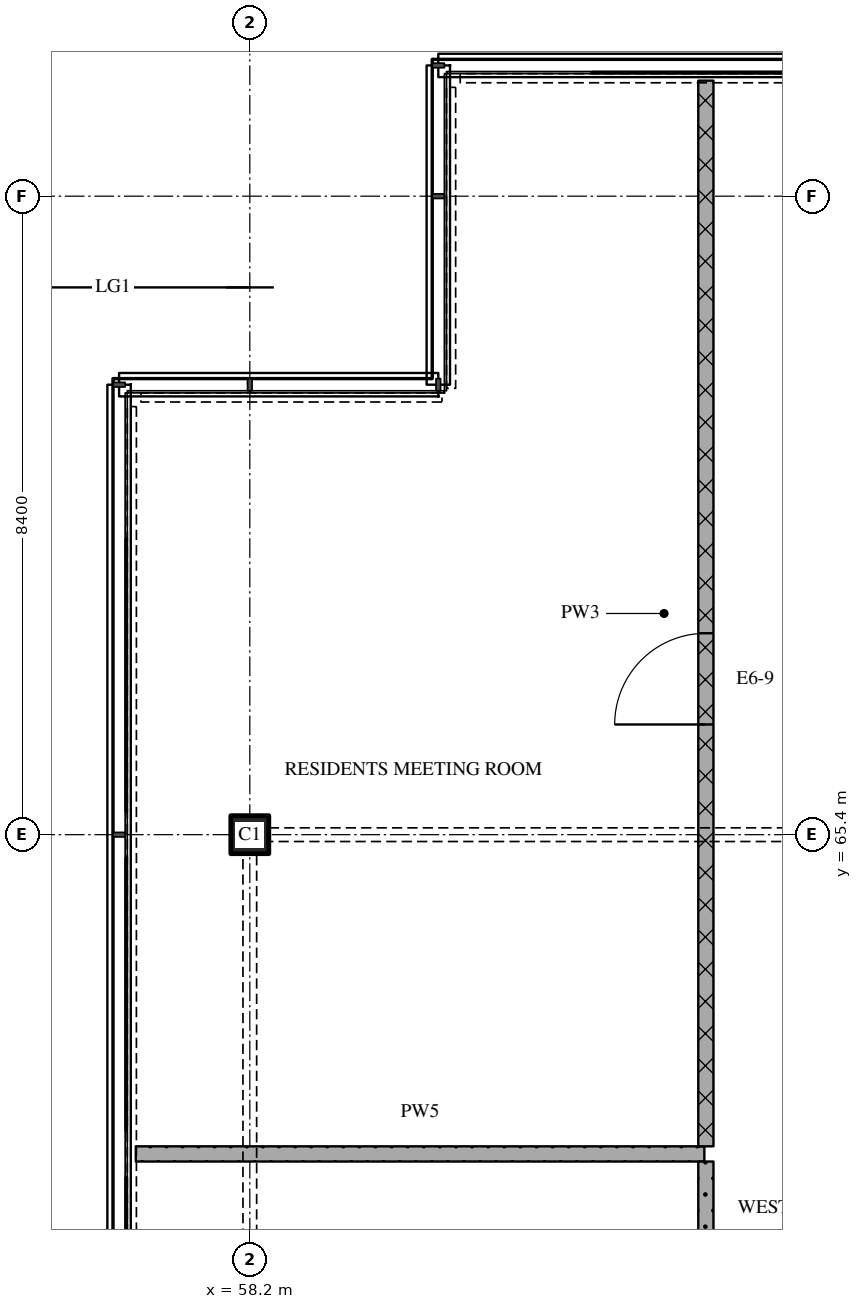
"""IFC4 building model, lengths in metres.
Left out: names, types, materials, properties, quantities, classifications, styles, units other than length and angle.
Written with IfcOpenShell. Run it as: python <this file> out.ifc"""

import sys

from ifc_helpers import new_model, si_unit, direction, frame, frame_2d, origin, origin_2d, place, context, subcontext, project, spatial, rectangle, extrude, element, fill, save


model = new_model("IFC4")
c1 = context("Model", 3, precision=1e-05, world=origin(), true_north=direction((0.0, 1.0)))
c2 = subcontext(c1, "Body", "Model", "MODEL_VIEW")
j1 = project(units=[si_unit("LENGTHUNIT", "METRE"), si_unit("PLANEANGLEUNIT", "RADIAN")], contexts=[c1])
p1 = place(None, origin())
s1 = spatial("IfcSite", under=j1, at=p1, CompositionType="ELEMENT")
p2 = place(p1, origin())
s2 = spatial("IfcBuilding", under=s1, at=p2, CompositionType="ELEMENT")
p3 = place(p2, frame((0.0, 0.0, 303.15)))
s3 = spatial("IfcBuildingStorey", under=s2, at=p3, CompositionType="ELEMENT", Elevation=303.15)
p4 = place(p3, frame((58.2, 65.4, 0.0), z_axis=(0.0, 0.0, 1.0), x_axis=(1.0, 0.0, 0.0)))
e1 = element("IfcColumn", 1, at=p4, inside=s3, PredefinedType="COLUMN", context=c2, shape_type="SweptSolid", body=[
    extrude(rectangle(XDim=0.5, YDim=0.5, at=origin_2d()), origin(), (0.0, 0.0, 1.0), 3.6),
])
p5 = place(p3, frame((56.7, 61.2, 0.0), z_axis=(0.0, 0.0, 1.0), x_axis=(1.0, 0.0, 0.0)))
e2 = element("IfcWall", 2, at=p5, inside=s3, PredefinedType="PARTITIONING", context=c2, shape_type="SweptSolid", body=[
    extrude(rectangle(XDim=7.48, YDim=0.2, at=frame_2d((3.74, 0.0))), origin(), (0.0, 0.0, 1.0), 3.32),
])
p6 = place(p3, frame((64.2, 61.3, 0.0), z_axis=(0.0, 0.0, 1.0), x_axis=(0.0, 1.0, 0.0)))
e3 = element("IfcWall", 3, at=p6, inside=s3, PredefinedType="PARTITIONING", context=c2, shape_type="SweptSolid", body=[
    extrude(rectangle(XDim=14.02, YDim=0.2, at=frame_2d((7.01, 0.0))), origin(), (0.0, 0.0, 1.0), 3.32),
])
p7 = place(p6, frame((5.55, 0.0, 0.0)))
e4 = element("IfcOpeningElement", 4, at=p7, cuts=e3, PredefinedType="OPENING", context=c2, shape_type="SweptSolid", body=[
    extrude(rectangle(XDim=1.2, YDim=2.1, at=frame_2d((0.6, 1.05))), frame((0.0, 0.11, 0.0), z_axis=(0.0, -1.0, 0.0), x_axis=(1.0, 0.0, 0.0)), (0.0, 0.0, 1.0), 0.22),
])
p8 = place(p3, frame((64.2, 61.1, 0.0), z_axis=(0.0, 0.0, 1.0), x_axis=(0.0, -1.0, 0.0)))
e5 = element("IfcWall", 5, at=p8, inside=s3, PredefinedType="PARTITIONING", context=c2, shape_type="SweptSolid", body=[
    extrude(rectangle(XDim=2.2, YDim=0.2, at=frame_2d((1.1, 0.0))), origin(), (0.0, 0.0, 1.0), 3.32),
])
p9 = place(p7, origin())
e6 = element("IfcDoor", 6, at=p9, inside=s3, OperationType="SINGLE_SWING_LEFT", PredefinedType="DOOR", context=c2, shape_type="SweptSolid", body=[
    extrude(rectangle(XDim=1.2, YDim=2.1, at=frame_2d((0.6, 1.05))), frame((0.0, 0.025, 0.0), z_axis=(0.0, -1.0, 0.0), x_axis=(1.0, 0.0, 0.0)), (0.0, 0.0, 1.0), 0.05),
])
fill(e4, e6)
save(model, sys.argv[1])
